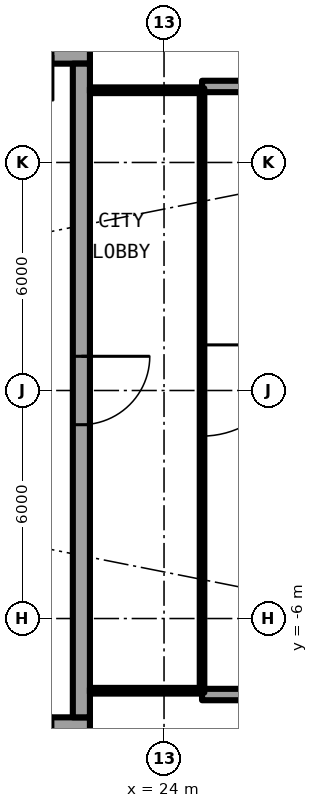
"""IFC4 building model, lengths in metres.
Left out: names, types, materials, properties, quantities, classifications, styles, units other than length and angle.
Written with IfcOpenShell. Run it as: python <this file> out.ifc"""

import sys

from ifc_helpers import new_model, si_unit, direction, frame, frame_2d, origin, place, context, subcontext, project, spatial, rectangle, extrude, element, fill, save


model = new_model("IFC4")
c1 = context("Model", 3, precision=1e-05, world=origin(), true_north=direction((0.0, 1.0)))
c2 = subcontext(c1, "Body", "Model", "MODEL_VIEW")
j1 = project(units=[si_unit("LENGTHUNIT", "METRE"), si_unit("PLANEANGLEUNIT", "RADIAN")], contexts=[c1])
p1 = place(None, origin())
s1 = spatial("IfcSite", under=j1, at=p1, CompositionType="ELEMENT")
p2 = place(p1, origin())
s2 = spatial("IfcBuilding", under=s1, at=p2, CompositionType="ELEMENT")
p3 = place(p2, frame((0.0, 0.0, 186.0)))
s3 = spatial("IfcBuildingStorey", under=s2, at=p3, CompositionType="ELEMENT", Elevation=186.0)
for number, where, z_axis, x_axis in (
    (1, (25.0, 8.0, 0.0), (0.0, 0.0, 1.0), (1.0, 0.0, 0.0)),
    (2, (25.0, -8.0, 0.0), (0.0, 0.0, 1.0), (1.0, 0.0, 0.0)),
):
    element("IfcWall", number, at=place(p3, frame(where, z_axis=z_axis, x_axis=x_axis)), inside=s3, PredefinedType="SOLIDWALL", context=c2, shape_type="SweptSolid", body=[
        extrude(rectangle(XDim=2.667, YDim=0.3, at=frame_2d((1.333, 0.0))), origin(), (0.0, 0.0, 1.0), 3.85),
    ])
p4 = place(p3, frame((22.05, 8.825, 0.0), z_axis=(0.0, 0.0, 1.0), x_axis=(-1.0, 0.0, 0.0)))
e3 = element("IfcWall", 3, at=p4, inside=s3, PredefinedType="SHEAR", context=c2, shape_type="SweptSolid", body=[
    extrude(rectangle(XDim=13.5, YDim=0.45, at=frame_2d((6.75, 0.0))), origin(), (0.0, 0.0, 1.0), 4.2),
])
p5 = place(p4, frame((0.975, 0.0, 0.0)))
e4 = element("IfcOpeningElement", 4, at=p5, cuts=e3, PredefinedType="OPENING", context=c2, shape_type="SweptSolid", body=[
    extrude(rectangle(XDim=1.2, YDim=2.3, at=frame_2d((0.6, 1.15))), frame((0.0, 0.235, 0.0), z_axis=(0.0, -1.0, 0.0), x_axis=(1.0, 0.0, 0.0)), (0.0, 0.0, 1.0), 0.47),
])
p6 = place(p4, frame((3.0, 0.0, 0.0)))
e5 = element("IfcOpeningElement", 5, at=p6, cuts=e3, PredefinedType="OPENING", context=c2, shape_type="SweptSolid", body=[
    extrude(rectangle(XDim=1.2, YDim=2.3, at=frame_2d((0.6, 1.15))), frame((0.0, 0.235, 0.0), z_axis=(0.0, -1.0, 0.0), x_axis=(1.0, 0.0, 0.0)), (0.0, 0.0, 1.0), 0.47),
])
p7 = place(p3, frame((8.55, -8.825, 0.0), z_axis=(0.0, 0.0, 1.0), x_axis=(1.0, 0.0, 0.0)))
e6 = element("IfcWall", 6, at=p7, inside=s3, PredefinedType="SHEAR", context=c2, shape_type="SweptSolid", body=[
    extrude(rectangle(XDim=13.5, YDim=0.45, at=frame_2d((6.75, 0.0))), origin(), (0.0, 0.0, 1.0), 4.2),
])
p8 = place(p7, frame((11.325, 0.0, 0.0)))
e7 = element("IfcOpeningElement", 7, at=p8, cuts=e6, PredefinedType="OPENING", context=c2, shape_type="SweptSolid", body=[
    extrude(rectangle(XDim=1.2, YDim=2.3, at=frame_2d((0.6, 1.15))), frame((0.0, 0.235, 0.0), z_axis=(0.0, -1.0, 0.0), x_axis=(1.0, 0.0, 0.0)), (0.0, 0.0, 1.0), 0.47),
])
p9 = place(p3, frame((21.825, 8.6, 0.0), z_axis=(0.0, 0.0, 1.0), x_axis=(0.0, -1.0, 0.0)))
e8 = element("IfcWall", 8, at=p9, inside=s3, PredefinedType="SHEAR", context=c2, shape_type="SweptSolid", body=[
    extrude(rectangle(XDim=17.2, YDim=0.45, at=frame_2d((8.6, 0.0))), origin(), (0.0, 0.0, 1.0), 4.2),
])
p10 = place(p9, frame((7.7, 0.0, 0.0)))
e9 = element("IfcOpeningElement", 9, at=p10, cuts=e8, PredefinedType="OPENING", context=c2, shape_type="SweptSolid", body=[
    extrude(rectangle(XDim=1.8, YDim=2.3, at=frame_2d((0.9, 1.15))), frame((0.0, 0.235, 0.0), z_axis=(0.0, -1.0, 0.0), x_axis=(1.0, 0.0, 0.0)), (0.0, 0.0, 1.0), 0.47),
])
for number, where, z_axis, x_axis in (
    (10, (22.05, -7.9, 0.0), (0.0, 0.0, 1.0), (1.0, 0.0, 0.0)),
    (11, (22.05, 7.9, 0.0), (0.0, 0.0, 1.0), (1.0, 0.0, 0.0)),
):
    element("IfcWall", number, at=place(p3, frame(where, z_axis=z_axis, x_axis=x_axis)), inside=s3, PredefinedType="PARTITIONING", context=c2, shape_type="SweptSolid", body=[
        extrude(rectangle(XDim=2.89, YDim=0.15, at=frame_2d((1.445, 0.0))), origin(), (0.0, 0.0, 1.0), 3.85),
    ])
p11 = place(p3, frame((25.0, 7.95, 0.0), z_axis=(0.0, 0.0, 1.0), x_axis=(0.0, -1.0, 0.0)))
e12 = element("IfcWall", 12, at=p11, inside=s3, PredefinedType="PARTITIONING", context=c2, shape_type="SweptSolid", body=[
    extrude(rectangle(XDim=15.9, YDim=0.12, at=frame_2d((7.95, 0.0))), origin(), (0.0, 0.0, 1.0), 3.85),
])
p12 = place(p11, frame((6.75, 0.0, 0.0)))
e13 = element("IfcOpeningElement", 13, at=p12, cuts=e12, PredefinedType="OPENING", context=c2, shape_type="SweptSolid", body=[
    extrude(rectangle(XDim=2.4, YDim=2.3, at=frame_2d((1.2, 1.15))), frame((0.0, 0.07, 0.0), z_axis=(0.0, -1.0, 0.0), x_axis=(1.0, 0.0, 0.0)), (0.0, 0.0, 1.0), 0.14),
])
p13 = place(p11, frame((11.55, 0.0, 0.1)))
e14 = element("IfcOpeningElement", 14, at=p13, cuts=e12, PredefinedType="OPENING", context=c2, shape_type="SweptSolid", body=[
    extrude(rectangle(XDim=3.4, YDim=3.5, at=frame_2d((1.7, 1.75))), frame((0.0, 0.07, 0.0), z_axis=(0.0, -1.0, 0.0), x_axis=(1.0, 0.0, 0.0)), (0.0, 0.0, 1.0), 0.14),
])
p14 = place(p11, frame((0.95, 0.0, 0.1)))
e15 = element("IfcOpeningElement", 15, at=p14, cuts=e12, PredefinedType="OPENING", context=c2, shape_type="SweptSolid", body=[
    extrude(rectangle(XDim=3.4, YDim=3.5, at=frame_2d((1.7, 1.75))), frame((0.0, 0.07, 0.0), z_axis=(0.0, -1.0, 0.0), x_axis=(1.0, 0.0, 0.0)), (0.0, 0.0, 1.0), 0.14),
])
p15 = place(p5, origin())
e16 = element("IfcDoor", 16, at=p15, inside=s3, OperationType="SINGLE_SWING_RIGHT", PredefinedType="DOOR", context=c2, shape_type="SweptSolid", body=[
    extrude(rectangle(XDim=1.2, YDim=2.3, at=frame_2d((0.6, 1.15))), frame((0.0, 0.025, 0.0), z_axis=(0.0, -1.0, 0.0), x_axis=(1.0, 0.0, 0.0)), (0.0, 0.0, 1.0), 0.05),
])
fill(e4, e16)
p16 = place(p8, origin())
e17 = element("IfcDoor", 17, at=p16, inside=s3, OperationType="SINGLE_SWING_LEFT", PredefinedType="DOOR", context=c2, shape_type="SweptSolid", body=[
    extrude(rectangle(XDim=1.2, YDim=2.3, at=frame_2d((0.6, 1.15))), frame((0.0, 0.025, 0.0), z_axis=(0.0, -1.0, 0.0), x_axis=(1.0, 0.0, 0.0)), (0.0, 0.0, 1.0), 0.05),
])
fill(e7, e17)
p17 = place(p10, origin())
e18 = element("IfcDoor", 18, at=p17, inside=s3, OperationType="SINGLE_SWING_LEFT", PredefinedType="DOOR", context=c2, shape_type="SweptSolid", body=[
    extrude(rectangle(XDim=1.8, YDim=2.3, at=frame_2d((0.9, 1.15))), frame((0.0, 0.025, 0.0), z_axis=(0.0, -1.0, 0.0), x_axis=(1.0, 0.0, 0.0)), (0.0, 0.0, 1.0), 0.05),
])
fill(e9, e18)
p18 = place(p12, origin())
e19 = element("IfcDoor", 19, at=p18, inside=s3, OperationType="SINGLE_SWING_LEFT", PredefinedType="DOOR", context=c2, shape_type="SweptSolid", body=[
    extrude(rectangle(XDim=2.4, YDim=2.3, at=frame_2d((1.2, 1.15))), frame((0.0, 0.025, 0.0), z_axis=(0.0, -1.0, 0.0), x_axis=(1.0, 0.0, 0.0)), (0.0, 0.0, 1.0), 0.05),
])
fill(e13, e19)
p19 = place(p13, origin())
e20 = element("IfcWindow", 20, at=p19, inside=s3, PartitioningType="SINGLE_PANEL", PredefinedType="WINDOW", context=c2, shape_type="SweptSolid", body=[
    extrude(rectangle(XDim=3.4, YDim=3.5, at=frame_2d((1.7, 1.75))), frame((0.0, 0.03, 0.0), z_axis=(0.0, -1.0, 0.0), x_axis=(1.0, 0.0, 0.0)), (0.0, 0.0, 1.0), 0.06),
])
fill(e14, e20)
p20 = place(p14, origin())
e21 = element("IfcWindow", 21, at=p20, inside=s3, PartitioningType="SINGLE_PANEL", PredefinedType="WINDOW", context=c2, shape_type="SweptSolid", body=[
    extrude(rectangle(XDim=3.4, YDim=3.5, at=frame_2d((1.7, 1.75))), frame((0.0, 0.03, 0.0), z_axis=(0.0, -1.0, 0.0), x_axis=(1.0, 0.0, 0.0)), (0.0, 0.0, 1.0), 0.06),
])
fill(e15, e21)
save(model, sys.argv[1])
